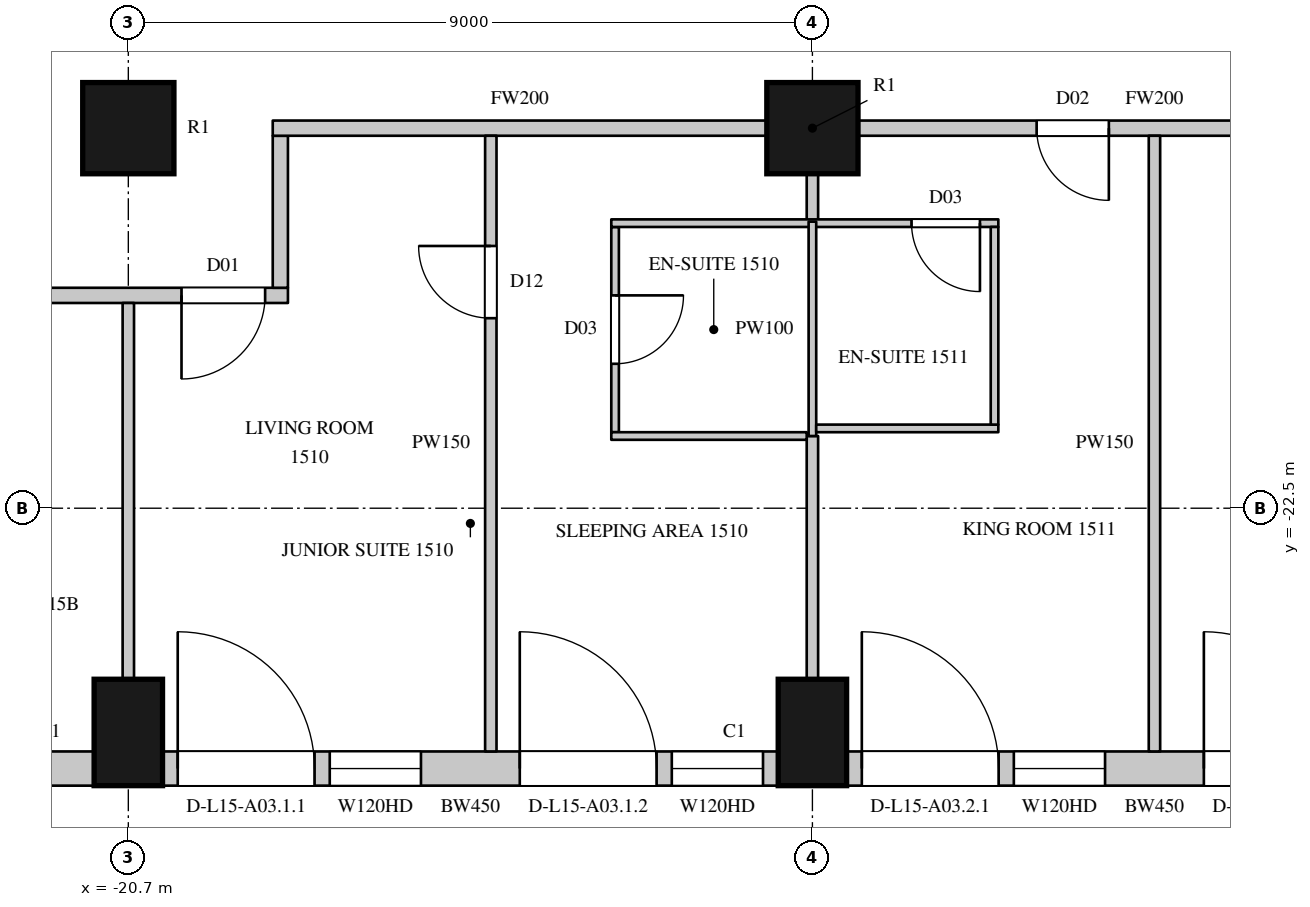
"""IFC4 building model, lengths in metres.
Left out: names, types, materials, properties, quantities, classifications, styles, units other than length and angle.
Written with IfcOpenShell. Run it as: python <this file> out.ifc"""

import sys

from ifc_helpers import new_model, si_unit, direction, frame, frame_2d, origin, origin_2d, place, context, subcontext, project, spatial, rectangle, circle, extrude, element, fill, save


model = new_model("IFC4")
c1 = context("Model", 3, precision=1e-05, world=origin(), true_north=direction((0.0, 1.0)))
c2 = subcontext(c1, "Body", "Model", "MODEL_VIEW")
j1 = project(units=[si_unit("LENGTHUNIT", "METRE"), si_unit("PLANEANGLEUNIT", "RADIAN")], contexts=[c1])
p1 = place(None, origin())
s1 = spatial("IfcSite", under=j1, at=p1, CompositionType="ELEMENT")
p2 = place(p1, origin())
s2 = spatial("IfcBuilding", under=s1, at=p2, CompositionType="ELEMENT")
p3 = place(p2, frame((0.0, 0.0, 84.3)))
s3 = spatial("IfcBuildingStorey", under=s2, at=p3, CompositionType="ELEMENT", Elevation=84.3)
for number, where, z_axis, x_axis in (
    (1, (-20.7, -25.45, 0.0), (0.0, 0.0, 1.0), (1.0, 0.0, 0.0)),
    (2, (-11.7, -25.45, 0.0), (0.0, 0.0, 1.0), (1.0, 0.0, 0.0)),
):
    element("IfcColumn", number, at=place(p3, frame(where, z_axis=z_axis, x_axis=x_axis)), inside=s3, PredefinedType="COLUMN", context=c2, shape_type="SweptSolid", body=[
        extrude(rectangle(XDim=0.9, YDim=1.4, at=origin_2d()), origin(), (0.0, 0.0, 1.0), 3.6),
    ])
for number, where, z_axis, x_axis in (
    (3, (-20.7, -17.5, 0.0), (0.0, 0.0, 1.0), (1.0, 0.0, 0.0)),
    (4, (-11.7, -17.5, 0.0), (0.0, 0.0, 1.0), (1.0, 0.0, 0.0)),
):
    element("IfcColumn", number, at=place(p3, frame(where, z_axis=z_axis, x_axis=x_axis)), inside=s3, PredefinedType="COLUMN", context=c2, shape_type="SweptSolid", body=[
        extrude(circle(Radius=0.6, at=origin_2d()), origin(), (0.0, 0.0, 1.0), 3.6),
    ])
p4 = place(p3, frame((-24.064, -25.925, 0.0), z_axis=(0.0, 0.0, 1.0), x_axis=(1.0, 0.0, 0.0)))
e5 = element("IfcWall", 5, at=p4, inside=s3, PredefinedType="SOLIDWALL", context=c2, shape_type="SweptSolid", body=[
    extrude(rectangle(XDim=2.914, YDim=0.45, at=frame_2d((1.457, 0.0))), origin(), (0.0, 0.0, 1.0), 3.3),
])
p5 = place(p3, frame((-20.25, -25.925, 0.0), z_axis=(0.0, 0.0, 1.0), x_axis=(1.0, 0.0, 0.0)))
e6 = element("IfcWall", 6, at=p5, inside=s3, PredefinedType="SOLIDWALL", context=c2, shape_type="SweptSolid", body=[
    extrude(rectangle(XDim=8.1, YDim=0.45, at=frame_2d((4.05, 0.0))), origin(), (0.0, 0.0, 1.0), 3.3),
])
p6 = place(p5, frame((0.2, 0.0, 0.0)))
e7 = element("IfcOpeningElement", 7, at=p6, cuts=e6, PredefinedType="OPENING", context=c2, shape_type="SweptSolid", body=[
    extrude(rectangle(XDim=1.8, YDim=2.4, at=frame_2d((0.9, 1.2))), frame((0.0, 0.235, 0.0), z_axis=(0.0, -1.0, 0.0), x_axis=(1.0, 0.0, 0.0)), (0.0, 0.0, 1.0), 0.47),
])
p7 = place(p5, frame((2.2, 0.0, 1.05)))
e8 = element("IfcOpeningElement", 8, at=p7, cuts=e6, PredefinedType="OPENING", context=c2, shape_type="SweptSolid", body=[
    extrude(rectangle(XDim=1.2, YDim=2.0, at=frame_2d((0.6, 1.0))), frame((0.0, 0.235, 0.0), z_axis=(0.0, -1.0, 0.0), x_axis=(1.0, 0.0, 0.0)), (0.0, 0.0, 1.0), 0.47),
])
p8 = place(p5, frame((4.7, 0.0, 0.0)))
e9 = element("IfcOpeningElement", 9, at=p8, cuts=e6, PredefinedType="OPENING", context=c2, shape_type="SweptSolid", body=[
    extrude(rectangle(XDim=1.8, YDim=2.4, at=frame_2d((0.9, 1.2))), frame((0.0, 0.235, 0.0), z_axis=(0.0, -1.0, 0.0), x_axis=(1.0, 0.0, 0.0)), (0.0, 0.0, 1.0), 0.47),
])
p9 = place(p5, frame((6.7, 0.0, 1.05)))
e10 = element("IfcOpeningElement", 10, at=p9, cuts=e6, PredefinedType="OPENING", context=c2, shape_type="SweptSolid", body=[
    extrude(rectangle(XDim=1.2, YDim=2.0, at=frame_2d((0.6, 1.0))), frame((0.0, 0.235, 0.0), z_axis=(0.0, -1.0, 0.0), x_axis=(1.0, 0.0, 0.0)), (0.0, 0.0, 1.0), 0.47),
])
p10 = place(p3, frame((-11.25, -25.925, 0.0), z_axis=(0.0, 0.0, 1.0), x_axis=(1.0, 0.0, 0.0)))
e11 = element("IfcWall", 11, at=p10, inside=s3, PredefinedType="SOLIDWALL", context=c2, shape_type="SweptSolid", body=[
    extrude(rectangle(XDim=8.1, YDim=0.45, at=frame_2d((4.05, 0.0))), origin(), (0.0, 0.0, 1.0), 3.3),
])
p11 = place(p10, frame((0.2, 0.0, 0.0)))
e12 = element("IfcOpeningElement", 12, at=p11, cuts=e11, PredefinedType="OPENING", context=c2, shape_type="SweptSolid", body=[
    extrude(rectangle(XDim=1.8, YDim=2.4, at=frame_2d((0.9, 1.2))), frame((0.0, 0.235, 0.0), z_axis=(0.0, -1.0, 0.0), x_axis=(1.0, 0.0, 0.0)), (0.0, 0.0, 1.0), 0.47),
])
p12 = place(p10, frame((2.2, 0.0, 1.05)))
e13 = element("IfcOpeningElement", 13, at=p12, cuts=e11, PredefinedType="OPENING", context=c2, shape_type="SweptSolid", body=[
    extrude(rectangle(XDim=1.2, YDim=2.0, at=frame_2d((0.6, 1.0))), frame((0.0, 0.235, 0.0), z_axis=(0.0, -1.0, 0.0), x_axis=(1.0, 0.0, 0.0)), (0.0, 0.0, 1.0), 0.47),
])
p13 = place(p10, frame((4.7, 0.0, 0.0)))
e14 = element("IfcOpeningElement", 14, at=p13, cuts=e11, PredefinedType="OPENING", context=c2, shape_type="SweptSolid", body=[
    extrude(rectangle(XDim=1.8, YDim=2.4, at=frame_2d((0.9, 1.2))), frame((0.0, 0.235, 0.0), z_axis=(0.0, -1.0, 0.0), x_axis=(1.0, 0.0, 0.0)), (0.0, 0.0, 1.0), 0.47),
])
p14 = place(p10, frame((6.7, 0.0, 1.05)))
e15 = element("IfcOpeningElement", 15, at=p14, cuts=e11, PredefinedType="OPENING", context=c2, shape_type="SweptSolid", body=[
    extrude(rectangle(XDim=1.2, YDim=2.0, at=frame_2d((0.6, 1.0))), frame((0.0, 0.235, 0.0), z_axis=(0.0, -1.0, 0.0), x_axis=(1.0, 0.0, 0.0)), (0.0, 0.0, 1.0), 0.47),
])
p15 = place(p3, frame((-23.7, -19.7, 0.0), z_axis=(0.0, 0.0, 1.0), x_axis=(1.0, 0.0, 0.0)))
e16 = element("IfcWall", 16, at=p15, inside=s3, PredefinedType="PARTITIONING", context=c2, shape_type="SweptSolid", body=[
    extrude(rectangle(XDim=5.1, YDim=0.2, at=frame_2d((2.55, 0.0))), origin(), (0.0, 0.0, 1.0), 3.3),
])
p16 = place(p15, frame((0.8, 0.0, 0.0)))
e17 = element("IfcOpeningElement", 17, at=p16, cuts=e16, PredefinedType="OPENING", context=c2, shape_type="SweptSolid", body=[
    extrude(rectangle(XDim=0.9, YDim=2.2, at=frame_2d((0.45, 1.1))), frame((0.0, 0.11, 0.0), z_axis=(0.0, -1.0, 0.0), x_axis=(1.0, 0.0, 0.0)), (0.0, 0.0, 1.0), 0.22),
])
p17 = place(p15, frame((3.7, 0.0, 0.0)))
e18 = element("IfcOpeningElement", 18, at=p17, cuts=e16, PredefinedType="OPENING", context=c2, shape_type="SweptSolid", body=[
    extrude(rectangle(XDim=1.1, YDim=2.4, at=frame_2d((0.55, 1.2))), frame((0.0, 0.11, 0.0), z_axis=(0.0, -1.0, 0.0), x_axis=(1.0, 0.0, 0.0)), (0.0, 0.0, 1.0), 0.22),
])
p18 = place(p3, frame((-18.7, -19.6, 0.0), z_axis=(0.0, 0.0, 1.0), x_axis=(0.0, 1.0, 0.0)))
e19 = element("IfcWall", 19, at=p18, inside=s3, PredefinedType="PARTITIONING", context=c2, shape_type="SweptSolid", body=[
    extrude(rectangle(XDim=2.0, YDim=0.2, at=frame_2d((1.0, 0.0))), origin(), (0.0, 0.0, 1.0), 3.3),
])
p19 = place(p3, frame((-18.8, -17.5, 0.0), z_axis=(0.0, 0.0, 1.0), x_axis=(1.0, 0.0, 0.0)))
e20 = element("IfcWall", 20, at=p19, inside=s3, PredefinedType="PARTITIONING", context=c2, shape_type="SweptSolid", body=[
    extrude(rectangle(XDim=6.5, YDim=0.2, at=frame_2d((3.25, 0.0))), origin(), (0.0, 0.0, 1.0), 2.75),
])
p20 = place(p3, frame((-11.1, -17.5, 0.0), z_axis=(0.0, 0.0, 1.0), x_axis=(1.0, 0.0, 0.0)))
e21 = element("IfcWall", 21, at=p20, inside=s3, PredefinedType="PARTITIONING", context=c2, shape_type="SweptSolid", body=[
    extrude(rectangle(XDim=7.8, YDim=0.2, at=frame_2d((3.9, 0.0))), origin(), (0.0, 0.0, 1.0), 2.75),
])
p21 = place(p20, frame((2.35, 0.0, 0.0)))
e22 = element("IfcOpeningElement", 22, at=p21, cuts=e21, PredefinedType="OPENING", context=c2, shape_type="SweptSolid", body=[
    extrude(rectangle(XDim=0.95, YDim=2.2, at=frame_2d((0.475, 1.1))), frame((0.0, 0.11, 0.0), z_axis=(0.0, -1.0, 0.0), x_axis=(1.0, 0.0, 0.0)), (0.0, 0.0, 1.0), 0.22),
])
p22 = place(p20, frame((5.15, 0.0, 0.0)))
e23 = element("IfcOpeningElement", 23, at=p22, cuts=e21, PredefinedType="OPENING", context=c2, shape_type="SweptSolid", body=[
    extrude(rectangle(XDim=1.1, YDim=2.4, at=frame_2d((0.55, 1.2))), frame((0.0, 0.11, 0.0), z_axis=(0.0, -1.0, 0.0), x_axis=(1.0, 0.0, 0.0)), (0.0, 0.0, 1.0), 0.22),
])
p23 = place(p3, frame((-20.7, -24.75, 0.0), z_axis=(0.0, 0.0, 1.0), x_axis=(0.0, 1.0, 0.0)))
e24 = element("IfcWall", 24, at=p23, inside=s3, PredefinedType="PARTITIONING", context=c2, shape_type="SweptSolid", body=[
    extrude(rectangle(XDim=4.95, YDim=0.15, at=frame_2d((2.475, 0.0))), origin(), (0.0, 0.0, 1.0), 2.75),
])
p24 = place(p3, frame((-15.931, -25.7, 0.0), z_axis=(0.0, 0.0, 1.0), x_axis=(0.0, 1.0, 0.0)))
e25 = element("IfcWall", 25, at=p24, inside=s3, PredefinedType="PARTITIONING", context=c2, shape_type="SweptSolid", body=[
    extrude(rectangle(XDim=8.1, YDim=0.15, at=frame_2d((4.05, 0.0))), origin(), (0.0, 0.0, 1.0), 3.3),
])
p25 = place(p24, frame((5.7, 0.0, 0.0)))
e26 = element("IfcOpeningElement", 26, at=p25, cuts=e25, PredefinedType="OPENING", context=c2, shape_type="SweptSolid", body=[
    extrude(rectangle(XDim=0.95, YDim=2.2, at=frame_2d((0.475, 1.1))), frame((0.0, 0.085, 0.0), z_axis=(0.0, -1.0, 0.0), x_axis=(1.0, 0.0, 0.0)), (0.0, 0.0, 1.0), 0.17),
])
p26 = place(p3, frame((-11.7, -24.75, 0.0), z_axis=(0.0, 0.0, 1.0), x_axis=(0.0, 1.0, 0.0)))
e27 = element("IfcWall", 27, at=p26, inside=s3, PredefinedType="PARTITIONING", context=c2, shape_type="SweptSolid", body=[
    extrude(rectangle(XDim=3.2, YDim=0.15, at=frame_2d((1.6, 0.0))), origin(), (0.0, 0.0, 1.0), 2.75),
])
p27 = place(p3, frame((-11.7, -18.73, 0.0), z_axis=(0.0, 0.0, 1.0), x_axis=(0.0, 1.0, 0.0)))
e28 = element("IfcWall", 28, at=p27, inside=s3, PredefinedType="PARTITIONING", context=c2, shape_type="SweptSolid", body=[
    extrude(rectangle(XDim=0.63, YDim=0.15, at=frame_2d((0.315, 0.0))), origin(), (0.0, 0.0, 1.0), 2.75),
])
p28 = place(p3, frame((-7.2, -25.7, 0.0), z_axis=(0.0, 0.0, 1.0), x_axis=(0.0, 1.0, 0.0)))
e29 = element("IfcWall", 29, at=p28, inside=s3, PredefinedType="PARTITIONING", context=c2, shape_type="SweptSolid", body=[
    extrude(rectangle(XDim=8.1, YDim=0.15, at=frame_2d((4.05, 0.0))), origin(), (0.0, 0.0, 1.0), 2.65),
])
p29 = place(p3, frame((-14.296, -21.5, 0.0), z_axis=(0.0, 0.0, 1.0), x_axis=(0.0, 1.0, 0.0)))
e30 = element("IfcWall", 30, at=p29, inside=s3, PredefinedType="PARTITIONING", context=c2, shape_type="SweptSolid", body=[
    extrude(rectangle(XDim=2.7, YDim=0.1, at=frame_2d((1.35, 0.0))), origin(), (0.0, 0.0, 1.0), 3.3),
])
p30 = place(p29, frame((0.9, 0.0, 0.0)))
e31 = element("IfcOpeningElement", 31, at=p30, cuts=e30, PredefinedType="OPENING", context=c2, shape_type="SweptSolid", body=[
    extrude(rectangle(XDim=0.9, YDim=2.2, at=frame_2d((0.45, 1.1))), frame((0.0, 0.06, 0.0), z_axis=(0.0, -1.0, 0.0), x_axis=(1.0, 0.0, 0.0)), (0.0, 0.0, 1.0), 0.12),
])
p31 = place(p3, frame((-14.346, -21.55, 0.0), z_axis=(0.0, 0.0, 1.0), x_axis=(1.0, 0.0, 0.0)))
e32 = element("IfcWall", 32, at=p31, inside=s3, PredefinedType="PARTITIONING", context=c2, shape_type="SweptSolid", body=[
    extrude(rectangle(XDim=2.571, YDim=0.1, at=frame_2d((1.286, 0.0))), origin(), (0.0, 0.0, 1.0), 3.3),
])
p32 = place(p3, frame((-14.346, -18.75, 0.0), z_axis=(0.0, 0.0, 1.0), x_axis=(1.0, 0.0, 0.0)))
e33 = element("IfcWall", 33, at=p32, inside=s3, PredefinedType="PARTITIONING", context=c2, shape_type="SweptSolid", body=[
    extrude(rectangle(XDim=5.092, YDim=0.1, at=frame_2d((2.546, 0.0))), origin(), (0.0, 0.0, 1.0), 3.3),
])
p33 = place(p32, frame((3.95, 0.0, 0.0)))
e34 = element("IfcOpeningElement", 34, at=p33, cuts=e33, PredefinedType="OPENING", context=c2, shape_type="SweptSolid", body=[
    extrude(rectangle(XDim=0.9, YDim=2.2, at=frame_2d((0.45, 1.1))), frame((0.0, 0.06, 0.0), z_axis=(0.0, -1.0, 0.0), x_axis=(1.0, 0.0, 0.0)), (0.0, 0.0, 1.0), 0.12),
])
p34 = place(p3, frame((-11.7, -21.55, 0.0), z_axis=(0.0, 0.0, 1.0), x_axis=(0.0, 1.0, 0.0)))
e35 = element("IfcWall", 35, at=p34, inside=s3, PredefinedType="PARTITIONING", context=c2, shape_type="SweptSolid", body=[
    extrude(rectangle(XDim=2.82, YDim=0.1, at=frame_2d((1.41, 0.0))), origin(), (0.0, 0.0, 1.0), 2.75),
])
p35 = place(p3, frame((-11.65, -21.45, 0.0), z_axis=(0.0, 0.0, 1.0), x_axis=(1.0, 0.0, 0.0)))
e36 = element("IfcWall", 36, at=p35, inside=s3, PredefinedType="PARTITIONING", context=c2, shape_type="SweptSolid", body=[
    extrude(rectangle(XDim=2.396, YDim=0.1, at=frame_2d((1.198, 0.0))), origin(), (0.0, 0.0, 1.0), 3.3),
])
p36 = place(p3, frame((-9.304, -21.4, 0.0), z_axis=(0.0, 0.0, 1.0), x_axis=(0.0, 1.0, 0.0)))
e37 = element("IfcWall", 37, at=p36, inside=s3, PredefinedType="PARTITIONING", context=c2, shape_type="SweptSolid", body=[
    extrude(rectangle(XDim=2.6, YDim=0.1, at=frame_2d((1.3, 0.0))), origin(), (0.0, 0.0, 1.0), 3.3),
])
p37 = place(p6, origin())
e38 = element("IfcDoor", 38, at=p37, inside=s3, OperationType="SLIDING_TO_LEFT", PredefinedType="DOOR", context=c2, shape_type="SweptSolid", body=[
    extrude(rectangle(XDim=1.8, YDim=2.4, at=frame_2d((0.9, 1.2))), frame((0.0, 0.13, 0.0), z_axis=(0.0, -1.0, 0.0), x_axis=(1.0, 0.0, 0.0)), (0.0, 0.0, 1.0), 0.05),
])
fill(e7, e38)
p38 = place(p7, origin())
e39 = element("IfcWindow", 39, at=p38, inside=s3, PartitioningType="SINGLE_PANEL", PredefinedType="WINDOW", context=c2, shape_type="SweptSolid", body=[
    extrude(rectangle(XDim=1.2, YDim=2.0, at=frame_2d((0.6, 1.0))), frame((0.0, 0.135, 0.0), z_axis=(0.0, -1.0, 0.0), x_axis=(1.0, 0.0, 0.0)), (0.0, 0.0, 1.0), 0.06),
])
fill(e8, e39)
p39 = place(p8, origin())
e40 = element("IfcDoor", 40, at=p39, inside=s3, OperationType="SLIDING_TO_LEFT", PredefinedType="DOOR", context=c2, shape_type="SweptSolid", body=[
    extrude(rectangle(XDim=1.8, YDim=2.4, at=frame_2d((0.9, 1.2))), frame((0.0, 0.13, 0.0), z_axis=(0.0, -1.0, 0.0), x_axis=(1.0, 0.0, 0.0)), (0.0, 0.0, 1.0), 0.05),
])
fill(e9, e40)
p40 = place(p9, origin())
e41 = element("IfcWindow", 41, at=p40, inside=s3, PartitioningType="SINGLE_PANEL", PredefinedType="WINDOW", context=c2, shape_type="SweptSolid", body=[
    extrude(rectangle(XDim=1.2, YDim=2.0, at=frame_2d((0.6, 1.0))), frame((0.0, 0.135, 0.0), z_axis=(0.0, -1.0, 0.0), x_axis=(1.0, 0.0, 0.0)), (0.0, 0.0, 1.0), 0.06),
])
fill(e10, e41)
p41 = place(p11, origin())
e42 = element("IfcDoor", 42, at=p41, inside=s3, OperationType="SLIDING_TO_LEFT", PredefinedType="DOOR", context=c2, shape_type="SweptSolid", body=[
    extrude(rectangle(XDim=1.8, YDim=2.4, at=frame_2d((0.9, 1.2))), frame((0.0, 0.13, 0.0), z_axis=(0.0, -1.0, 0.0), x_axis=(1.0, 0.0, 0.0)), (0.0, 0.0, 1.0), 0.05),
])
fill(e12, e42)
p42 = place(p12, origin())
e43 = element("IfcWindow", 43, at=p42, inside=s3, PartitioningType="SINGLE_PANEL", PredefinedType="WINDOW", context=c2, shape_type="SweptSolid", body=[
    extrude(rectangle(XDim=1.2, YDim=2.0, at=frame_2d((0.6, 1.0))), frame((0.0, 0.135, 0.0), z_axis=(0.0, -1.0, 0.0), x_axis=(1.0, 0.0, 0.0)), (0.0, 0.0, 1.0), 0.06),
])
fill(e13, e43)
p43 = place(p13, origin())
e44 = element("IfcDoor", 44, at=p43, inside=s3, OperationType="SLIDING_TO_LEFT", PredefinedType="DOOR", context=c2, shape_type="SweptSolid", body=[
    extrude(rectangle(XDim=1.8, YDim=2.4, at=frame_2d((0.9, 1.2))), frame((0.0, 0.13, 0.0), z_axis=(0.0, -1.0, 0.0), x_axis=(1.0, 0.0, 0.0)), (0.0, 0.0, 1.0), 0.05),
])
fill(e14, e44)
p44 = place(p17, origin())
e45 = element("IfcDoor", 45, at=p44, inside=s3, OperationType="SINGLE_SWING_RIGHT", PredefinedType="DOOR", context=c2, shape_type="SweptSolid", body=[
    extrude(rectangle(XDim=1.1, YDim=2.4, at=frame_2d((0.55, 1.2))), frame((0.0, 0.025, 0.0), z_axis=(0.0, -1.0, 0.0), x_axis=(1.0, 0.0, 0.0)), (0.0, 0.0, 1.0), 0.05),
])
fill(e18, e45)
p45 = place(p25, origin())
e46 = element("IfcDoor", 46, at=p45, inside=s3, OperationType="SINGLE_SWING_RIGHT", PredefinedType="DOOR", context=c2, shape_type="SweptSolid", body=[
    extrude(rectangle(XDim=0.95, YDim=2.2, at=frame_2d((0.475, 1.1))), frame((0.0, 0.025, 0.0), z_axis=(0.0, -1.0, 0.0), x_axis=(1.0, 0.0, 0.0)), (0.0, 0.0, 1.0), 0.05),
])
fill(e26, e46)
p46 = place(p30, origin())
e47 = element("IfcDoor", 47, at=p46, inside=s3, OperationType="SINGLE_SWING_LEFT", PredefinedType="DOOR", context=c2, shape_type="SweptSolid", body=[
    extrude(rectangle(XDim=0.9, YDim=2.2, at=frame_2d((0.45, 1.1))), frame((0.0, 0.025, 0.0), z_axis=(0.0, -1.0, 0.0), x_axis=(1.0, 0.0, 0.0)), (0.0, 0.0, 1.0), 0.05),
])
fill(e31, e47)
p47 = place(p21, origin())
e48 = element("IfcDoor", 48, at=p47, inside=s3, OperationType="SINGLE_SWING_LEFT", PredefinedType="DOOR", context=c2, shape_type="SweptSolid", body=[
    extrude(rectangle(XDim=0.95, YDim=2.2, at=frame_2d((0.475, 1.1))), frame((0.0, 0.025, 0.0), z_axis=(0.0, -1.0, 0.0), x_axis=(1.0, 0.0, 0.0)), (0.0, 0.0, 1.0), 0.05),
])
fill(e22, e48)
p48 = place(p33, origin())
e49 = element("IfcDoor", 49, at=p48, inside=s3, OperationType="SINGLE_SWING_LEFT", PredefinedType="DOOR", context=c2, shape_type="SweptSolid", body=[
    extrude(rectangle(XDim=0.9, YDim=2.2, at=frame_2d((0.45, 1.1))), frame((0.0, 0.025, 0.0), z_axis=(0.0, -1.0, 0.0), x_axis=(1.0, 0.0, 0.0)), (0.0, 0.0, 1.0), 0.05),
])
fill(e34, e49)
save(model, sys.argv[1])
